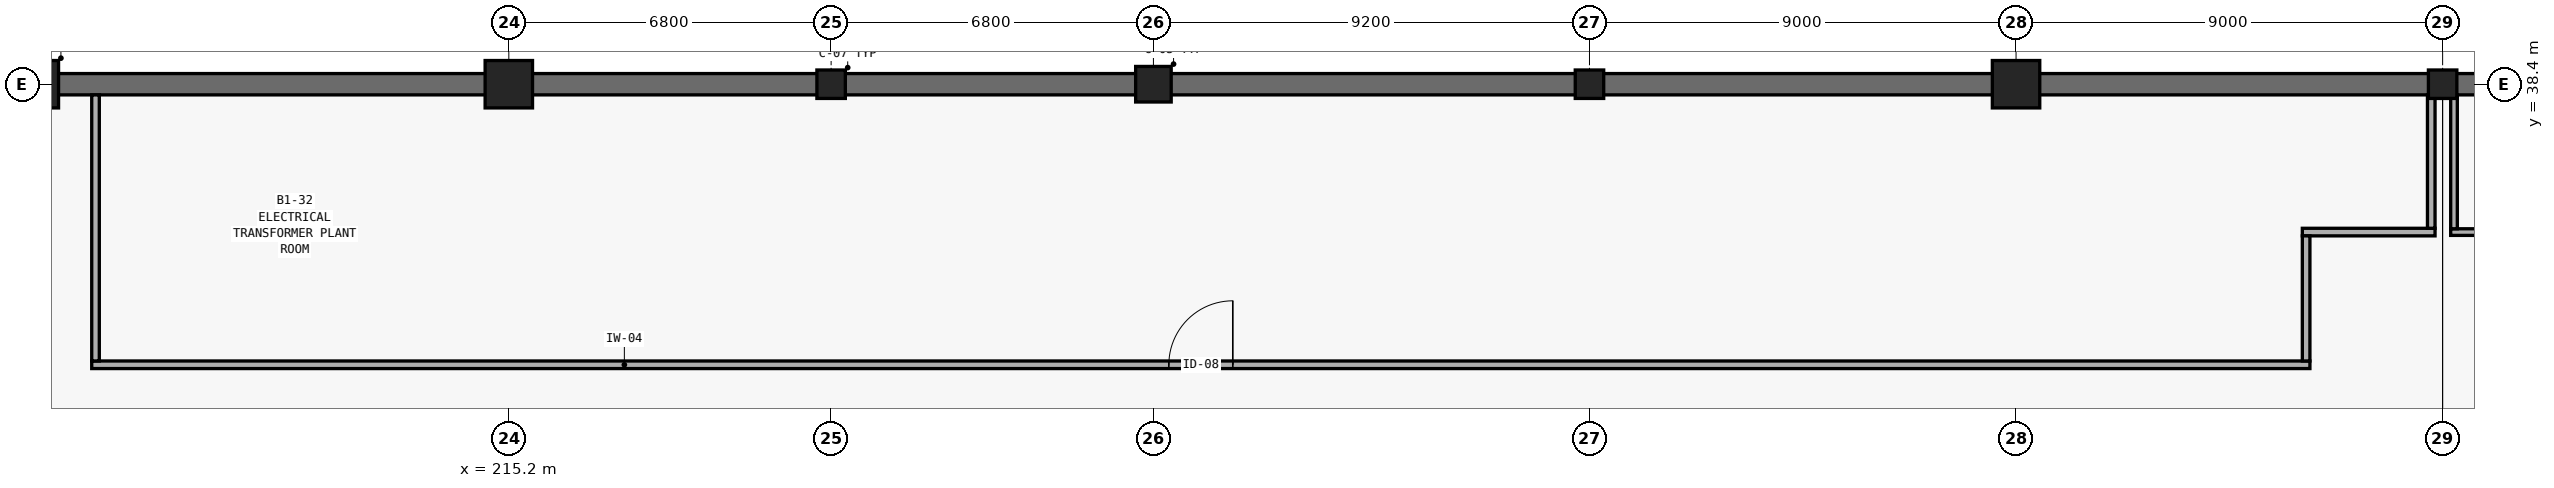
"""IFC4 building model, lengths in metres.
Left out: names, types, materials, properties, quantities, classifications, styles, units other than length and angle.
Written with IfcOpenShell. Run it as: python <this file> out.ifc"""

import sys

from ifc_helpers import new_model, si_unit, direction, frame, frame_2d, origin, origin_2d, place, context, subcontext, project, spatial, rectangle, extrude, element, fill, save


model = new_model("IFC4")
c1 = context("Model", 3, precision=1e-05, world=origin(), true_north=direction((0.0, 1.0)))
c2 = subcontext(c1, "Body", "Model", "MODEL_VIEW")
j1 = project(units=[si_unit("LENGTHUNIT", "METRE"), si_unit("PLANEANGLEUNIT", "RADIAN")], contexts=[c1])
p1 = place(None, origin())
s1 = spatial("IfcSite", under=j1, at=p1, CompositionType="ELEMENT")
p2 = place(p1, origin())
s2 = spatial("IfcBuilding", under=s1, at=p2, CompositionType="ELEMENT")
p3 = place(p2, frame((0.0, 0.0, -4.8)))
s3 = spatial("IfcBuildingStorey", under=s2, at=p3, CompositionType="ELEMENT", Elevation=-4.8)
for number, where, z_axis, x_axis in (
    (1, (205.2, 38.4, 0.0), (0.0, 0.0, 1.0), (1.0, 0.0, 0.0)),
    (2, (215.2, 38.4, 0.0), (0.0, 0.0, 1.0), (1.0, 0.0, 0.0)),
):
    element("IfcColumn", number, at=place(p3, frame(where, z_axis=z_axis, x_axis=x_axis)), inside=s3, PredefinedType="COLUMN", context=c2, shape_type="SweptSolid", body=[
        extrude(rectangle(XDim=1.0, YDim=1.0, at=origin_2d()), origin(), (0.0, 0.0, 1.0), 4.8),
    ])
p4 = place(p3, frame((222.0, 38.4, 0.0), z_axis=(0.0, 0.0, 1.0), x_axis=(1.0, 0.0, 0.0)))
e3 = element("IfcColumn", 3, at=p4, inside=s3, PredefinedType="COLUMN", context=c2, shape_type="SweptSolid", body=[
    extrude(rectangle(XDim=0.6, YDim=0.6, at=origin_2d()), origin(), (0.0, 0.0, 1.0), 4.8),
])
p5 = place(p3, frame((228.8, 38.4, 0.0), z_axis=(0.0, 0.0, 1.0), x_axis=(1.0, 0.0, 0.0)))
e4 = element("IfcColumn", 4, at=p5, inside=s3, PredefinedType="COLUMN", context=c2, shape_type="SweptSolid", body=[
    extrude(rectangle(XDim=0.75, YDim=0.75, at=origin_2d()), origin(), (0.0, 0.0, 1.0), 4.8),
])
p6 = place(p3, frame((238.0, 38.4, 0.0), z_axis=(0.0, 0.0, 1.0), x_axis=(1.0, 0.0, 0.0)))
e5 = element("IfcColumn", 5, at=p6, inside=s3, PredefinedType="COLUMN", context=c2, shape_type="SweptSolid", body=[
    extrude(rectangle(XDim=0.6, YDim=0.6, at=origin_2d()), origin(), (0.0, 0.0, 1.0), 4.8),
])
p7 = place(p3, frame((247.0, 38.4, 0.0), z_axis=(0.0, 0.0, 1.0), x_axis=(1.0, 0.0, 0.0)))
e6 = element("IfcColumn", 6, at=p7, inside=s3, PredefinedType="COLUMN", context=c2, shape_type="SweptSolid", body=[
    extrude(rectangle(XDim=1.0, YDim=1.0, at=origin_2d()), origin(), (0.0, 0.0, 1.0), 4.8),
])
p8 = place(p3, frame((256.0, 38.4, 0.0), z_axis=(0.0, 0.0, 1.0), x_axis=(1.0, 0.0, 0.0)))
e7 = element("IfcColumn", 7, at=p8, inside=s3, PredefinedType="COLUMN", context=c2, shape_type="SweptSolid", body=[
    extrude(rectangle(XDim=0.6, YDim=0.6, at=origin_2d()), origin(), (0.0, 0.0, 1.0), 4.8),
])
p9 = place(p3, frame((266.0, 38.4, 0.0), z_axis=(0.0, 0.0, 1.0), x_axis=(-1.0, 0.0, 0.0)))
e8 = element("IfcWall", 8, at=p9, inside=s3, PredefinedType="SHEAR", context=c2, shape_type="SweptSolid", body=[
    extrude(rectangle(XDim=10.0, YDim=0.45, at=frame_2d((5.0, 0.0))), origin(), (0.0, 0.0, 1.0), 4.8),
])
for number, where, z_axis, x_axis in (
    (9, (256.0, 38.4, 0.0), (0.0, 0.0, 1.0), (-1.0, 0.0, 0.0)),
    (10, (247.0, 38.4, 0.0), (0.0, 0.0, 1.0), (-1.0, 0.0, 0.0)),
):
    element("IfcWall", number, at=place(p3, frame(where, z_axis=z_axis, x_axis=x_axis)), inside=s3, PredefinedType="SHEAR", context=c2, shape_type="SweptSolid", body=[
        extrude(rectangle(XDim=9.0, YDim=0.45, at=frame_2d((4.5, 0.0))), origin(), (0.0, 0.0, 1.0), 4.8),
    ])
p10 = place(p3, frame((238.0, 38.4, 0.0), z_axis=(0.0, 0.0, 1.0), x_axis=(-1.0, 0.0, 0.0)))
e11 = element("IfcWall", 11, at=p10, inside=s3, PredefinedType="SHEAR", context=c2, shape_type="SweptSolid", body=[
    extrude(rectangle(XDim=9.2, YDim=0.45, at=frame_2d((4.6, 0.0))), origin(), (0.0, 0.0, 1.0), 4.8),
])
for number, where, z_axis, x_axis in (
    (12, (228.8, 38.4, 0.0), (0.0, 0.0, 1.0), (-1.0, 0.0, 0.0)),
    (13, (222.0, 38.4, 0.0), (0.0, 0.0, 1.0), (-1.0, 0.0, 0.0)),
):
    element("IfcWall", number, at=place(p3, frame(where, z_axis=z_axis, x_axis=x_axis)), inside=s3, PredefinedType="SHEAR", context=c2, shape_type="SweptSolid", body=[
        extrude(rectangle(XDim=6.8, YDim=0.45, at=frame_2d((3.4, 0.0))), origin(), (0.0, 0.0, 1.0), 4.8),
    ])
p11 = place(p3, frame((215.2, 38.4, 0.0), z_axis=(0.0, 0.0, 1.0), x_axis=(-1.0, 0.0, 0.0)))
e14 = element("IfcWall", 14, at=p11, inside=s3, PredefinedType="SHEAR", context=c2, shape_type="SweptSolid", body=[
    extrude(rectangle(XDim=10.0, YDim=0.45, at=frame_2d((5.0, 0.0))), origin(), (0.0, 0.0, 1.0), 4.8),
])
p12 = place(p3, frame((206.4, 32.48, 0.0), z_axis=(0.0, 0.0, 1.0), x_axis=(1.0, 0.0, 0.0)))
e15 = element("IfcWall", 15, at=p12, inside=s3, PredefinedType="PARTITIONING", context=c2, shape_type="SweptSolid", body=[
    extrude(rectangle(XDim=46.8, YDim=0.16, at=frame_2d((23.4, 0.0))), origin(), (0.0, 0.0, 1.0), 3.26),
])
p13 = place(p12, frame((22.725, 0.0, 0.0)))
e16 = element("IfcOpeningElement", 16, at=p13, cuts=e15, PredefinedType="OPENING", context=c2, shape_type="SweptSolid", body=[
    extrude(rectangle(XDim=1.35, YDim=2.2, at=frame_2d((0.675, 1.1))), frame((0.0, 0.095, 0.0), z_axis=(0.0, -1.0, 0.0), x_axis=(1.0, 0.0, 0.0)), (0.0, 0.0, 1.0), 0.19),
])
p14 = place(p3, frame((253.04, 35.28, 0.0), z_axis=(0.0, 0.0, 1.0), x_axis=(1.0, 0.0, 0.0)))
e17 = element("IfcWall", 17, at=p14, inside=s3, PredefinedType="PARTITIONING", context=c2, shape_type="SweptSolid", body=[
    extrude(rectangle(XDim=2.8, YDim=0.16, at=frame_2d((1.4, 0.0))), origin(), (0.0, 0.0, 1.0), 3.26),
])
p15 = place(p3, frame((256.17, 35.28, 0.0), z_axis=(0.0, 0.0, 1.0), x_axis=(1.0, 0.0, 0.0)))
e18 = element("IfcWall", 18, at=p15, inside=s3, PredefinedType="PARTITIONING", context=c2, shape_type="SweptSolid", body=[
    extrude(rectangle(XDim=2.78, YDim=0.14, at=frame_2d((1.39, 0.0))), origin(), (0.0, 0.0, 1.0), 3.26),
])
p16 = place(p3, frame((206.48, 32.56, 0.0), z_axis=(0.0, 0.0, 1.0), x_axis=(0.0, 1.0, 0.0)))
e19 = element("IfcWall", 19, at=p16, inside=s3, PredefinedType="PARTITIONING", context=c2, shape_type="SweptSolid", body=[
    extrude(rectangle(XDim=5.615, YDim=0.16, at=frame_2d((2.808, 0.0))), origin(), (0.0, 0.0, 1.0), 3.26),
])
p17 = place(p3, frame((253.12, 32.56, 0.0), z_axis=(0.0, 0.0, 1.0), x_axis=(0.0, 1.0, 0.0)))
e20 = element("IfcWall", 20, at=p17, inside=s3, PredefinedType="PARTITIONING", context=c2, shape_type="SweptSolid", body=[
    extrude(rectangle(XDim=2.64, YDim=0.16, at=frame_2d((1.32, 0.0))), origin(), (0.0, 0.0, 1.0), 3.26),
])
p18 = place(p3, frame((255.76, 35.36, 0.0), z_axis=(0.0, 0.0, 1.0), x_axis=(0.0, 1.0, 0.0)))
e21 = element("IfcWall", 21, at=p18, inside=s3, PredefinedType="PARTITIONING", context=c2, shape_type="SweptSolid", body=[
    extrude(rectangle(XDim=2.815, YDim=0.16, at=frame_2d((1.407, 0.0))), origin(), (0.0, 0.0, 1.0), 3.26),
])
p19 = place(p3, frame((256.24, 35.35, 0.0), z_axis=(0.0, 0.0, 1.0), x_axis=(0.0, 1.0, 0.0)))
e22 = element("IfcWall", 22, at=p19, inside=s3, PredefinedType="PARTITIONING", context=c2, shape_type="SweptSolid", body=[
    extrude(rectangle(XDim=2.825, YDim=0.14, at=frame_2d((1.413, 0.0))), origin(), (0.0, 0.0, 1.0), 3.26),
])
p20 = place(p13, origin())
e23 = element("IfcDoor", 23, at=p20, inside=s3, OperationType="SINGLE_SWING_RIGHT", PredefinedType="DOOR", context=c2, shape_type="SweptSolid", body=[
    extrude(rectangle(XDim=1.35, YDim=2.2, at=frame_2d((0.675, 1.1))), frame((0.0, 0.025, 0.0), z_axis=(0.0, -1.0, 0.0), x_axis=(1.0, 0.0, 0.0)), (0.0, 0.0, 1.0), 0.05),
])
fill(e16, e23)
save(model, sys.argv[1])
